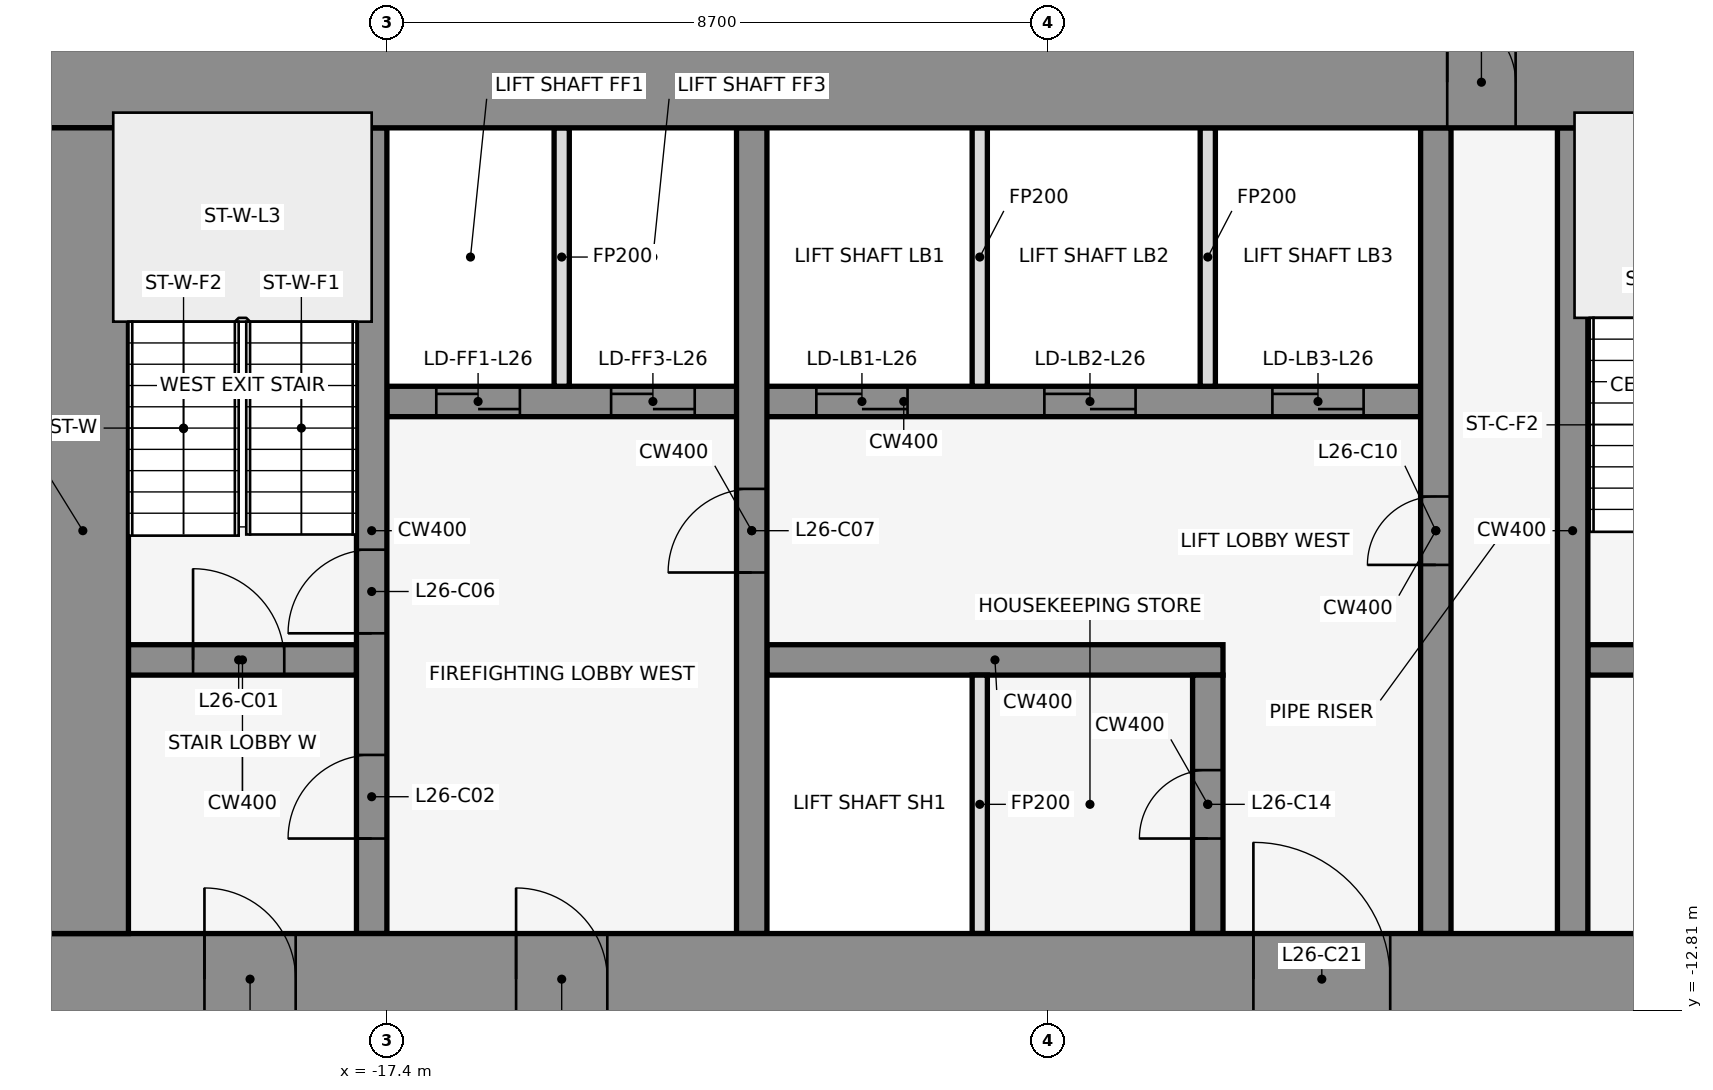
"""IFC4 building model, lengths in metres.
Left out: names, types, materials, properties, quantities, classifications, styles, units other than length and angle.
Written with IfcOpenShell. Run it as: python <this file> out.ifc"""

import sys

from ifc_helpers import new_model, si_unit, direction, frame, frame_2d, origin, place, context, subcontext, project, spatial, rectangle, extrude, element, fill, save


model = new_model("IFC4")
c1 = context("Model", 3, precision=1e-05, world=origin(), true_north=direction((0.0, 1.0)))
c2 = subcontext(c1, "Body", "Model", "MODEL_VIEW")
j1 = project(units=[si_unit("LENGTHUNIT", "METRE"), si_unit("PLANEANGLEUNIT", "RADIAN")], contexts=[c1])
p1 = place(None, origin())
s1 = spatial("IfcSite", under=j1, at=p1, CompositionType="ELEMENT")
p2 = place(p1, origin())
s2 = spatial("IfcBuilding", under=s1, at=p2, CompositionType="ELEMENT")
p3 = place(p2, frame((0.0, 0.0, 122.7)))
s3 = spatial("IfcBuildingStorey", under=s2, at=p3, CompositionType="ELEMENT", Elevation=122.7)
for number, where, z_axis, x_axis in (
    (1, (-0.068, -0.105, 0.0), (0.0, 0.0, 1.0), (-0.84, 0.543, 0.0)),
    (2, (-14.599, 1.08, 0.0), (0.0, 0.0, 1.0), (-0.84, -0.543, 0.0)),
):
    element("IfcWall", number, at=place(p3, frame(where, z_axis=z_axis, x_axis=x_axis)), inside=s3, PredefinedType="STANDARD", context=c2, shape_type="SweptSolid", body=[
        extrude(rectangle(XDim=2.183, YDim=0.25, at=frame_2d((1.091, 0.0))), origin(), (0.0, 0.0, 1.0), 3.95),
    ])
p4 = place(p3, frame((-20.8, -8.2, 0.0), z_axis=(0.0, 0.0, 1.0), x_axis=(1.0, 0.0, 0.0)))
e3 = element("IfcWall", 3, at=p4, inside=s3, PredefinedType="SHEAR", context=c2, shape_type="SweptSolid", body=[
    extrude(rectangle(XDim=3.0, YDim=0.4, at=frame_2d((1.5, 0.0))), origin(), (0.0, 0.0, 1.0), 4.1),
])
p5 = place(p4, frame((0.85, 0.0, 0.0)))
e4 = element("IfcOpeningElement", 4, at=p5, cuts=e3, PredefinedType="OPENING", context=c2, shape_type="SweptSolid", body=[
    extrude(rectangle(XDim=1.2, YDim=2.1, at=frame_2d((0.6, 1.05))), frame((0.0, 0.212, 0.0), z_axis=(0.0, -1.0, 0.0), x_axis=(1.0, 0.0, 0.0)), (0.0, 0.0, 1.0), 0.424),
])
p6 = place(p3, frame((-12.4, -8.2, 0.0), z_axis=(0.0, 0.0, 1.0), x_axis=(1.0, 0.0, 0.0)))
e5 = element("IfcWall", 5, at=p6, inside=s3, PredefinedType="SHEAR", context=c2, shape_type="SweptSolid", body=[
    extrude(rectangle(XDim=6.0, YDim=0.4, at=frame_2d((3.0, 0.0))), origin(), (0.0, 0.0, 1.0), 4.1),
])
p7 = place(p3, frame((-1.6, -8.2, 0.0), z_axis=(0.0, 0.0, 1.0), x_axis=(1.0, 0.0, 0.0)))
e6 = element("IfcWall", 6, at=p7, inside=s3, PredefinedType="SHEAR", context=c2, shape_type="SweptSolid", body=[
    extrude(rectangle(XDim=3.2, YDim=0.4, at=frame_2d((1.6, 0.0))), origin(), (0.0, 0.0, 1.0), 4.1),
])
p8 = place(p7, frame((1.05, 0.0, 0.0)))
e7 = element("IfcOpeningElement", 7, at=p8, cuts=e6, PredefinedType="OPENING", context=c2, shape_type="SweptSolid", body=[
    extrude(rectangle(XDim=1.2, YDim=2.1, at=frame_2d((0.6, 1.05))), frame((0.0, 0.212, 0.0), z_axis=(0.0, -1.0, 0.0), x_axis=(1.0, 0.0, 0.0)), (0.0, 0.0, 1.0), 0.424),
])
p9 = place(p3, frame((-17.4, -4.8, 0.0), z_axis=(0.0, 0.0, 1.0), x_axis=(1.0, 0.0, 0.0)))
e8 = element("IfcWall", 8, at=p9, inside=s3, PredefinedType="SHEAR", context=c2, shape_type="SweptSolid", body=[
    extrude(rectangle(XDim=13.6, YDim=0.4, at=frame_2d((6.8, 0.0))), origin(), (0.0, 0.0, 1.0), 4.1),
])
p10 = place(p9, frame((0.65, 0.0, 0.0)))
e9 = element("IfcOpeningElement", 9, at=p10, cuts=e8, PredefinedType="OPENING", context=c2, shape_type="SweptSolid", body=[
    extrude(rectangle(XDim=1.1, YDim=2.1, at=frame_2d((0.55, 1.05))), frame((0.0, 0.212, 0.0), z_axis=(0.0, -1.0, 0.0), x_axis=(1.0, 0.0, 0.0)), (0.0, 0.0, 1.0), 0.424),
])
p11 = place(p9, frame((2.95, 0.0, 0.0)))
e10 = element("IfcOpeningElement", 10, at=p11, cuts=e8, PredefinedType="OPENING", context=c2, shape_type="SweptSolid", body=[
    extrude(rectangle(XDim=1.1, YDim=2.1, at=frame_2d((0.55, 1.05))), frame((0.0, 0.212, 0.0), z_axis=(0.0, -1.0, 0.0), x_axis=(1.0, 0.0, 0.0)), (0.0, 0.0, 1.0), 0.424),
])
p12 = place(p9, frame((5.65, 0.0, 0.0)))
e11 = element("IfcOpeningElement", 11, at=p12, cuts=e8, PredefinedType="OPENING", context=c2, shape_type="SweptSolid", body=[
    extrude(rectangle(XDim=1.2, YDim=2.1, at=frame_2d((0.6, 1.05))), frame((0.0, 0.212, 0.0), z_axis=(0.0, -1.0, 0.0), x_axis=(1.0, 0.0, 0.0)), (0.0, 0.0, 1.0), 0.424),
])
p13 = place(p9, frame((8.65, 0.0, 0.0)))
e12 = element("IfcOpeningElement", 12, at=p13, cuts=e8, PredefinedType="OPENING", context=c2, shape_type="SweptSolid", body=[
    extrude(rectangle(XDim=1.2, YDim=2.1, at=frame_2d((0.6, 1.05))), frame((0.0, 0.212, 0.0), z_axis=(0.0, -1.0, 0.0), x_axis=(1.0, 0.0, 0.0)), (0.0, 0.0, 1.0), 0.424),
])
p14 = place(p9, frame((11.65, 0.0, 0.0)))
e13 = element("IfcOpeningElement", 13, at=p14, cuts=e8, PredefinedType="OPENING", context=c2, shape_type="SweptSolid", body=[
    extrude(rectangle(XDim=1.2, YDim=2.1, at=frame_2d((0.6, 1.05))), frame((0.0, 0.212, 0.0), z_axis=(0.0, -1.0, 0.0), x_axis=(1.0, 0.0, 0.0)), (0.0, 0.0, 1.0), 0.424),
])
p15 = place(p3, frame((-17.6, -11.8, 0.0), z_axis=(0.0, 0.0, 1.0), x_axis=(0.0, 1.0, 0.0)))
e14 = element("IfcWall", 14, at=p15, inside=s3, PredefinedType="SHEAR", context=c2, shape_type="SweptSolid", body=[
    extrude(rectangle(XDim=10.6, YDim=0.4, at=frame_2d((5.3, 0.0))), origin(), (0.0, 0.0, 1.0), 4.1),
])
p16 = place(p15, frame((1.25, 0.0, 0.0)))
e15 = element("IfcOpeningElement", 15, at=p16, cuts=e14, PredefinedType="OPENING", context=c2, shape_type="SweptSolid", body=[
    extrude(rectangle(XDim=1.1, YDim=2.1, at=frame_2d((0.55, 1.05))), frame((0.0, 0.212, 0.0), z_axis=(0.0, -1.0, 0.0), x_axis=(1.0, 0.0, 0.0)), (0.0, 0.0, 1.0), 0.424),
])
p17 = place(p15, frame((3.95, 0.0, 0.0)))
e16 = element("IfcOpeningElement", 16, at=p17, cuts=e14, PredefinedType="OPENING", context=c2, shape_type="SweptSolid", body=[
    extrude(rectangle(XDim=1.1, YDim=2.1, at=frame_2d((0.55, 1.05))), frame((0.0, 0.212, 0.0), z_axis=(0.0, -1.0, 0.0), x_axis=(1.0, 0.0, 0.0)), (0.0, 0.0, 1.0), 0.424),
])
p18 = place(p3, frame((-15.1, -4.6, 0.0), z_axis=(0.0, 0.0, 1.0), x_axis=(0.0, 1.0, 0.0)))
e17 = element("IfcWall", 17, at=p18, inside=s3, PredefinedType="PARTITIONING", context=c2, shape_type="SweptSolid", body=[
    extrude(rectangle(XDim=3.4, YDim=0.2, at=frame_2d((1.7, 0.0))), origin(), (0.0, 0.0, 1.0), 3.018),
])
p19 = place(p3, frame((-12.6, -11.8, 0.0), z_axis=(0.0, 0.0, 1.0), x_axis=(0.0, 1.0, 0.0)))
e18 = element("IfcWall", 18, at=p19, inside=s3, PredefinedType="SHEAR", context=c2, shape_type="SweptSolid", body=[
    extrude(rectangle(XDim=10.6, YDim=0.4, at=frame_2d((5.3, 0.0))), origin(), (0.0, 0.0, 1.0), 4.1),
])
p20 = place(p19, frame((4.75, 0.0, 0.0)))
e19 = element("IfcOpeningElement", 19, at=p20, cuts=e18, PredefinedType="OPENING", context=c2, shape_type="SweptSolid", body=[
    extrude(rectangle(XDim=1.1, YDim=2.1, at=frame_2d((0.55, 1.05))), frame((0.0, 0.212, 0.0), z_axis=(0.0, -1.0, 0.0), x_axis=(1.0, 0.0, 0.0)), (0.0, 0.0, 1.0), 0.424),
])
for number, where, z_axis, x_axis in (
    (20, (-9.6, -11.8, 0.0), (0.0, 0.0, 1.0), (0.0, 1.0, 0.0)),
    (21, (-9.6, -4.6, 0.0), (0.0, 0.0, 1.0), (0.0, 1.0, 0.0)),
):
    element("IfcWall", number, at=place(p3, frame(where, z_axis=z_axis, x_axis=x_axis)), inside=s3, PredefinedType="PARTITIONING", context=c2, shape_type="SweptSolid", body=[
        extrude(rectangle(XDim=3.4, YDim=0.2, at=frame_2d((1.7, 0.0))), origin(), (0.0, 0.0, 1.0), 3.018),
    ])
p21 = place(p3, frame((-6.6, -11.8, 0.0), z_axis=(0.0, 0.0, 1.0), x_axis=(0.0, 1.0, 0.0)))
e22 = element("IfcWall", 22, at=p21, inside=s3, PredefinedType="SHEAR", context=c2, shape_type="SweptSolid", body=[
    extrude(rectangle(XDim=3.4, YDim=0.4, at=frame_2d((1.7, 0.0))), origin(), (0.0, 0.0, 1.0), 4.1),
])
p22 = place(p21, frame((1.25, 0.0, 0.0)))
e23 = element("IfcOpeningElement", 23, at=p22, cuts=e22, PredefinedType="OPENING", context=c2, shape_type="SweptSolid", body=[
    extrude(rectangle(XDim=0.9, YDim=2.1, at=frame_2d((0.45, 1.05))), frame((0.0, 0.212, 0.0), z_axis=(0.0, -1.0, 0.0), x_axis=(1.0, 0.0, 0.0)), (0.0, 0.0, 1.0), 0.424),
])
p23 = place(p3, frame((-6.6, -4.6, 0.0), z_axis=(0.0, 0.0, 1.0), x_axis=(0.0, 1.0, 0.0)))
e24 = element("IfcWall", 24, at=p23, inside=s3, PredefinedType="PARTITIONING", context=c2, shape_type="SweptSolid", body=[
    extrude(rectangle(XDim=3.4, YDim=0.2, at=frame_2d((1.7, 0.0))), origin(), (0.0, 0.0, 1.0), 3.018),
])
p24 = place(p3, frame((-3.6, -11.8, 0.0), z_axis=(0.0, 0.0, 1.0), x_axis=(0.0, 1.0, 0.0)))
e25 = element("IfcWall", 25, at=p24, inside=s3, PredefinedType="SHEAR", context=c2, shape_type="SweptSolid", body=[
    extrude(rectangle(XDim=10.6, YDim=0.4, at=frame_2d((5.3, 0.0))), origin(), (0.0, 0.0, 1.0), 4.1),
])
p25 = place(p24, frame((4.85, 0.0, 0.0)))
e26 = element("IfcOpeningElement", 26, at=p25, cuts=e25, PredefinedType="OPENING", context=c2, shape_type="SweptSolid", body=[
    extrude(rectangle(XDim=0.9, YDim=2.1, at=frame_2d((0.45, 1.05))), frame((0.0, 0.212, 0.0), z_axis=(0.0, -1.0, 0.0), x_axis=(1.0, 0.0, 0.0)), (0.0, 0.0, 1.0), 0.424),
])
p26 = place(p3, frame((-1.8, -11.8, 0.0), z_axis=(0.0, 0.0, 1.0), x_axis=(0.0, 1.0, 0.0)))
e27 = element("IfcWall", 27, at=p26, inside=s3, PredefinedType="SHEAR", context=c2, shape_type="SweptSolid", body=[
    extrude(rectangle(XDim=10.6, YDim=0.4, at=frame_2d((5.3, 0.0))), origin(), (0.0, 0.0, 1.0), 4.1),
])
p27 = place(p3, frame((-22.0, -0.6, 0.0), z_axis=(0.0, 0.0, 1.0), x_axis=(1.0, 0.0, 0.0)))
e28 = element("IfcWall", 28, at=p27, inside=s3, PredefinedType="SHEAR", context=c2, shape_type="SweptSolid", body=[
    extrude(rectangle(XDim=44.0, YDim=1.2, at=frame_2d((22.0, 0.0))), origin(), (0.0, 0.0, 1.0), 4.1),
])
p28 = place(p27, frame((18.55, 0.0, 0.0)))
e29 = element("IfcOpeningElement", 29, at=p28, cuts=e28, PredefinedType="OPENING", context=c2, shape_type="SweptSolid", body=[
    extrude(rectangle(XDim=0.9, YDim=2.1, at=frame_2d((0.45, 1.05))), frame((0.0, 0.612, 0.0), z_axis=(0.0, -1.0, 0.0), x_axis=(1.0, 0.0, 0.0)), (0.0, 0.0, 1.0), 1.224),
])
p29 = place(p27, frame((24.55, 0.0, 0.0)))
e30 = element("IfcOpeningElement", 30, at=p29, cuts=e28, PredefinedType="OPENING", context=c2, shape_type="SweptSolid", body=[
    extrude(rectangle(XDim=0.9, YDim=2.1, at=frame_2d((0.45, 1.05))), frame((0.0, 0.612, 0.0), z_axis=(0.0, -1.0, 0.0), x_axis=(1.0, 0.0, 0.0)), (0.0, 0.0, 1.0), 1.224),
])
p30 = place(p3, frame((-22.0, -12.4, 0.0), z_axis=(0.0, 0.0, 1.0), x_axis=(1.0, 0.0, 0.0)))
e31 = element("IfcWall", 31, at=p30, inside=s3, PredefinedType="SHEAR", context=c2, shape_type="SweptSolid", body=[
    extrude(rectangle(XDim=44.0, YDim=1.2, at=frame_2d((22.0, 0.0))), origin(), (0.0, 0.0, 1.0), 4.1),
])
p31 = place(p30, frame((2.2, 0.0, 0.0)))
e32 = element("IfcOpeningElement", 32, at=p31, cuts=e31, PredefinedType="OPENING", context=c2, shape_type="SweptSolid", body=[
    extrude(rectangle(XDim=1.2, YDim=2.1, at=frame_2d((0.6, 1.05))), frame((0.0, 0.612, 0.0), z_axis=(0.0, -1.0, 0.0), x_axis=(1.0, 0.0, 0.0)), (0.0, 0.0, 1.0), 1.224),
])
p32 = place(p30, frame((21.4, 0.0, 0.0)))
e33 = element("IfcOpeningElement", 33, at=p32, cuts=e31, PredefinedType="OPENING", context=c2, shape_type="SweptSolid", body=[
    extrude(rectangle(XDim=1.2, YDim=2.1, at=frame_2d((0.6, 1.05))), frame((0.0, 0.612, 0.0), z_axis=(0.0, -1.0, 0.0), x_axis=(1.0, 0.0, 0.0)), (0.0, 0.0, 1.0), 1.224),
])
p33 = place(p30, frame((40.6, 0.0, 0.0)))
e34 = element("IfcOpeningElement", 34, at=p33, cuts=e31, PredefinedType="OPENING", context=c2, shape_type="SweptSolid", body=[
    extrude(rectangle(XDim=1.2, YDim=2.1, at=frame_2d((0.6, 1.05))), frame((0.0, 0.612, 0.0), z_axis=(0.0, -1.0, 0.0), x_axis=(1.0, 0.0, 0.0)), (0.0, 0.0, 1.0), 1.224),
])
p34 = place(p30, frame((16.0, 0.0, 0.0)))
e35 = element("IfcOpeningElement", 35, at=p34, cuts=e31, PredefinedType="OPENING", context=c2, shape_type="SweptSolid", body=[
    extrude(rectangle(XDim=1.8, YDim=2.1, at=frame_2d((0.9, 1.05))), frame((0.0, 0.612, 0.0), z_axis=(0.0, -1.0, 0.0), x_axis=(1.0, 0.0, 0.0)), (0.0, 0.0, 1.0), 1.224),
])
p35 = place(p30, frame((6.3, 0.0, 0.0)))
e36 = element("IfcOpeningElement", 36, at=p35, cuts=e31, PredefinedType="OPENING", context=c2, shape_type="SweptSolid", body=[
    extrude(rectangle(XDim=1.2, YDim=2.1, at=frame_2d((0.6, 1.05))), frame((0.0, 0.612, 0.0), z_axis=(0.0, -1.0, 0.0), x_axis=(1.0, 0.0, 0.0)), (0.0, 0.0, 1.0), 1.224),
])
p36 = place(p30, frame((26.2, 0.0, 0.0)))
e37 = element("IfcOpeningElement", 37, at=p36, cuts=e31, PredefinedType="OPENING", context=c2, shape_type="SweptSolid", body=[
    extrude(rectangle(XDim=1.8, YDim=2.1, at=frame_2d((0.9, 1.05))), frame((0.0, 0.612, 0.0), z_axis=(0.0, -1.0, 0.0), x_axis=(1.0, 0.0, 0.0)), (0.0, 0.0, 1.0), 1.224),
])
p37 = place(p30, frame((36.5, 0.0, 0.0)))
e38 = element("IfcOpeningElement", 38, at=p37, cuts=e31, PredefinedType="OPENING", context=c2, shape_type="SweptSolid", body=[
    extrude(rectangle(XDim=1.2, YDim=2.1, at=frame_2d((0.6, 1.05))), frame((0.0, 0.612, 0.0), z_axis=(0.0, -1.0, 0.0), x_axis=(1.0, 0.0, 0.0)), (0.0, 0.0, 1.0), 1.224),
])
p38 = place(p3, frame((-21.4, -11.8, 0.0), z_axis=(0.0, 0.0, 1.0), x_axis=(0.0, 1.0, 0.0)))
e39 = element("IfcWall", 39, at=p38, inside=s3, PredefinedType="SHEAR", context=c2, shape_type="SweptSolid", body=[
    extrude(rectangle(XDim=10.6, YDim=1.2, at=frame_2d((5.3, 0.0))), origin(), (0.0, 0.0, 1.0), 4.1),
])
p39 = place(p5, origin())
e40 = element("IfcDoor", 40, at=p39, inside=s3, OperationType="SINGLE_SWING_LEFT", PredefinedType="DOOR", context=c2, shape_type="SweptSolid", body=[
    extrude(rectangle(XDim=1.2, YDim=2.1, at=frame_2d((0.6, 1.05))), frame((0.0, 0.025, 0.0), z_axis=(0.0, -1.0, 0.0), x_axis=(1.0, 0.0, 0.0)), (0.0, 0.0, 1.0), 0.05),
])
fill(e4, e40)
p40 = place(p16, frame((1.1, 0.0, 0.0), z_axis=(0.0, 0.0, 1.0), x_axis=(-1.0, 0.0, 0.0)))
e41 = element("IfcDoor", 41, at=p40, inside=s3, OperationType="SINGLE_SWING_LEFT", PredefinedType="DOOR", context=c2, shape_type="SweptSolid", body=[
    extrude(rectangle(XDim=1.1, YDim=2.1, at=frame_2d((0.55, 1.05))), frame((0.0, 0.025, 0.0), z_axis=(0.0, -1.0, 0.0), x_axis=(1.0, 0.0, 0.0)), (0.0, 0.0, 1.0), 0.05),
])
fill(e15, e41)
p41 = place(p10, origin())
e42 = element("IfcDoor", 42, at=p41, inside=s3, OperationType="DOUBLE_DOOR_SLIDING", PredefinedType="DOOR", context=c2, shape_type="SweptSolid", body=[
    extrude(rectangle(XDim=1.1, YDim=2.1, at=frame_2d((0.55, 1.05))), frame((0.0, 0.025, 0.0), z_axis=(0.0, -1.0, 0.0), x_axis=(1.0, 0.0, 0.0)), (0.0, 0.0, 1.0), 0.05),
])
fill(e9, e42)
p42 = place(p11, origin())
e43 = element("IfcDoor", 43, at=p42, inside=s3, OperationType="DOUBLE_DOOR_SLIDING", PredefinedType="DOOR", context=c2, shape_type="SweptSolid", body=[
    extrude(rectangle(XDim=1.1, YDim=2.1, at=frame_2d((0.55, 1.05))), frame((0.0, 0.025, 0.0), z_axis=(0.0, -1.0, 0.0), x_axis=(1.0, 0.0, 0.0)), (0.0, 0.0, 1.0), 0.05),
])
fill(e10, e43)
p43 = place(p12, origin())
e44 = element("IfcDoor", 44, at=p43, inside=s3, OperationType="DOUBLE_DOOR_SLIDING", PredefinedType="DOOR", context=c2, shape_type="SweptSolid", body=[
    extrude(rectangle(XDim=1.2, YDim=2.1, at=frame_2d((0.6, 1.05))), frame((0.0, 0.025, 0.0), z_axis=(0.0, -1.0, 0.0), x_axis=(1.0, 0.0, 0.0)), (0.0, 0.0, 1.0), 0.05),
])
fill(e11, e44)
p44 = place(p13, origin())
e45 = element("IfcDoor", 45, at=p44, inside=s3, OperationType="DOUBLE_DOOR_SLIDING", PredefinedType="DOOR", context=c2, shape_type="SweptSolid", body=[
    extrude(rectangle(XDim=1.2, YDim=2.1, at=frame_2d((0.6, 1.05))), frame((0.0, 0.025, 0.0), z_axis=(0.0, -1.0, 0.0), x_axis=(1.0, 0.0, 0.0)), (0.0, 0.0, 1.0), 0.05),
])
fill(e12, e45)
p45 = place(p14, origin())
e46 = element("IfcDoor", 46, at=p45, inside=s3, OperationType="DOUBLE_DOOR_SLIDING", PredefinedType="DOOR", context=c2, shape_type="SweptSolid", body=[
    extrude(rectangle(XDim=1.2, YDim=2.1, at=frame_2d((0.6, 1.05))), frame((0.0, 0.025, 0.0), z_axis=(0.0, -1.0, 0.0), x_axis=(1.0, 0.0, 0.0)), (0.0, 0.0, 1.0), 0.05),
])
fill(e13, e46)
p46 = place(p17, frame((1.1, 0.0, 0.0), z_axis=(0.0, 0.0, 1.0), x_axis=(-1.0, 0.0, 0.0)))
e47 = element("IfcDoor", 47, at=p46, inside=s3, OperationType="SINGLE_SWING_LEFT", PredefinedType="DOOR", context=c2, shape_type="SweptSolid", body=[
    extrude(rectangle(XDim=1.1, YDim=2.1, at=frame_2d((0.55, 1.05))), frame((0.0, 0.025, 0.0), z_axis=(0.0, -1.0, 0.0), x_axis=(1.0, 0.0, 0.0)), (0.0, 0.0, 1.0), 0.05),
])
fill(e16, e47)
p47 = place(p20, origin())
e48 = element("IfcDoor", 48, at=p47, inside=s3, OperationType="SINGLE_SWING_LEFT", PredefinedType="DOOR", context=c2, shape_type="SweptSolid", body=[
    extrude(rectangle(XDim=1.1, YDim=2.1, at=frame_2d((0.55, 1.05))), frame((0.0, 0.025, 0.0), z_axis=(0.0, -1.0, 0.0), x_axis=(1.0, 0.0, 0.0)), (0.0, 0.0, 1.0), 0.05),
])
fill(e19, e48)
p48 = place(p25, frame((0.9, 0.0, 0.0), z_axis=(0.0, 0.0, 1.0), x_axis=(-1.0, 0.0, 0.0)))
e49 = element("IfcDoor", 49, at=p48, inside=s3, OperationType="SINGLE_SWING_LEFT", PredefinedType="DOOR", context=c2, shape_type="SweptSolid", body=[
    extrude(rectangle(XDim=0.9, YDim=2.1, at=frame_2d((0.45, 1.05))), frame((0.0, 0.025, 0.0), z_axis=(0.0, -1.0, 0.0), x_axis=(1.0, 0.0, 0.0)), (0.0, 0.0, 1.0), 0.05),
])
fill(e26, e49)
p49 = place(p22, origin())
e50 = element("IfcDoor", 50, at=p49, inside=s3, OperationType="SINGLE_SWING_RIGHT", PredefinedType="DOOR", context=c2, shape_type="SweptSolid", body=[
    extrude(rectangle(XDim=0.9, YDim=2.1, at=frame_2d((0.45, 1.05))), frame((0.0, 0.025, 0.0), z_axis=(0.0, -1.0, 0.0), x_axis=(1.0, 0.0, 0.0)), (0.0, 0.0, 1.0), 0.05),
])
fill(e23, e50)
p50 = place(p28, origin())
e51 = element("IfcDoor", 51, at=p50, inside=s3, OperationType="SINGLE_SWING_LEFT", PredefinedType="DOOR", context=c2, shape_type="SweptSolid", body=[
    extrude(rectangle(XDim=0.9, YDim=2.1, at=frame_2d((0.45, 1.05))), frame((0.0, 0.025, 0.0), z_axis=(0.0, -1.0, 0.0), x_axis=(1.0, 0.0, 0.0)), (0.0, 0.0, 1.0), 0.05),
])
fill(e29, e51)
p51 = place(p31, frame((1.2, 0.0, 0.0), z_axis=(0.0, 0.0, 1.0), x_axis=(-1.0, 0.0, 0.0)))
e52 = element("IfcDoor", 52, at=p51, inside=s3, OperationType="SINGLE_SWING_RIGHT", PredefinedType="DOOR", context=c2, shape_type="SweptSolid", body=[
    extrude(rectangle(XDim=1.2, YDim=2.1, at=frame_2d((0.6, 1.05))), frame((0.0, 0.025, 0.0), z_axis=(0.0, -1.0, 0.0), x_axis=(1.0, 0.0, 0.0)), (0.0, 0.0, 1.0), 0.05),
])
fill(e32, e52)
p52 = place(p34, origin())
e53 = element("IfcDoor", 53, at=p52, inside=s3, OperationType="SINGLE_SWING_LEFT", PredefinedType="DOOR", context=c2, shape_type="SweptSolid", body=[
    extrude(rectangle(XDim=1.8, YDim=2.1, at=frame_2d((0.9, 1.05))), frame((0.0, 0.025, 0.0), z_axis=(0.0, -1.0, 0.0), x_axis=(1.0, 0.0, 0.0)), (0.0, 0.0, 1.0), 0.05),
])
fill(e35, e53)
p53 = place(p35, frame((1.2, 0.0, 0.0), z_axis=(0.0, 0.0, 1.0), x_axis=(-1.0, 0.0, 0.0)))
e54 = element("IfcDoor", 54, at=p53, inside=s3, OperationType="SINGLE_SWING_RIGHT", PredefinedType="DOOR", context=c2, shape_type="SweptSolid", body=[
    extrude(rectangle(XDim=1.2, YDim=2.1, at=frame_2d((0.6, 1.05))), frame((0.0, 0.025, 0.0), z_axis=(0.0, -1.0, 0.0), x_axis=(1.0, 0.0, 0.0)), (0.0, 0.0, 1.0), 0.05),
])
fill(e36, e54)
save(model, sys.argv[1])
